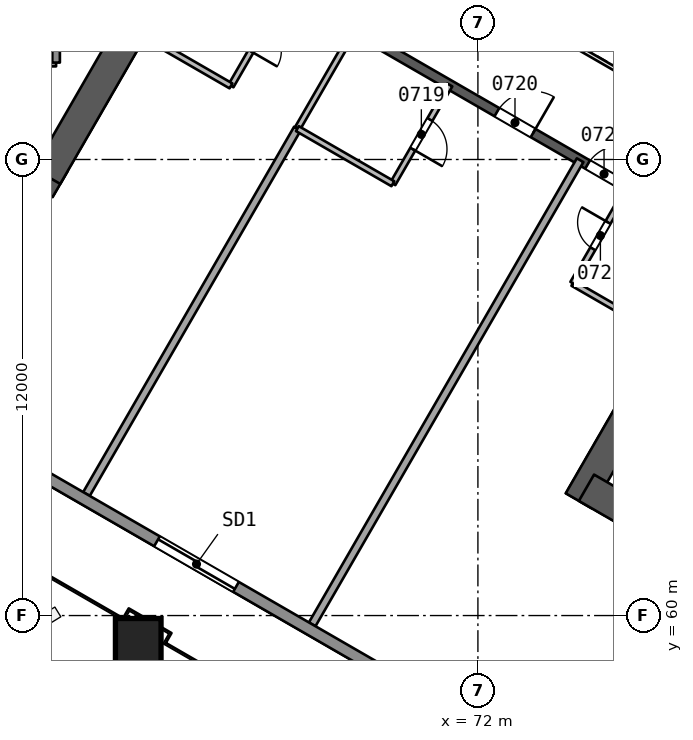
"""IFC4 building model, lengths in metres.
Left out: names, types, materials, properties, quantities, classifications, styles, units other than length and angle.
Written with IfcOpenShell. Run it as: python <this file> out.ifc"""

import sys

from ifc_helpers import new_model, si_unit, direction, frame, frame_2d, origin, origin_2d, place, context, subcontext, project, spatial, rectangle, extrude, element, fill, save


model = new_model("IFC4")
c1 = context("Model", 3, precision=1e-05, world=origin(), true_north=direction((0.0, 1.0)))
c2 = subcontext(c1, "Body", "Model", "MODEL_VIEW")
j1 = project(units=[si_unit("LENGTHUNIT", "METRE"), si_unit("PLANEANGLEUNIT", "RADIAN")], contexts=[c1])
p1 = place(None, origin())
s1 = spatial("IfcSite", under=j1, at=p1, CompositionType="ELEMENT")
p2 = place(p1, origin())
s2 = spatial("IfcBuilding", under=s1, at=p2, CompositionType="ELEMENT")
p3 = place(p2, frame((0.0, 0.0, 37.4)))
s3 = spatial("IfcBuildingStorey", under=s2, at=p3, CompositionType="ELEMENT", Elevation=37.4)
p4 = place(p3, frame((48.797, 78.408, 0.0), z_axis=(0.0, 0.0, 1.0), x_axis=(0.866032504327, -0.499987701298, 0.0)))
e1 = element("IfcWall", 1, at=p4, inside=s3, PredefinedType="SHEAR", context=c2, shape_type="SweptSolid", body=[
    extrude(rectangle(XDim=14.102, YDim=0.8, at=frame_2d((7.051, 0.0))), origin(), (0.0, 0.0, 1.0), 3.7),
])
p5 = place(p3, frame((60.664, 71.557, 0.0), z_axis=(0.0, 0.0, 1.0), x_axis=(0.50000409368, 0.866023040284, 0.0)))
e2 = element("IfcWall", 2, at=p5, inside=s3, PredefinedType="SHEAR", context=c2, shape_type="SweptSolid", body=[
    extrude(rectangle(XDim=9.98, YDim=0.8, at=frame_2d((4.99, 0.0))), origin(), (0.0, 0.0, 1.0), 3.7),
])
p6 = place(p5, frame((7.83, 0.0, 0.0)))
e3 = element("IfcOpeningElement", 3, at=p6, cuts=e2, PredefinedType="OPENING", context=c2, shape_type="SweptSolid", body=[
    extrude(rectangle(XDim=1.2, YDim=2.1, at=frame_2d((0.6, 1.05))), frame((0.0, 0.411, 0.0), z_axis=(0.0, -1.0, 0.0), x_axis=(1.0, 0.0, 0.0)), (0.0, 0.0, 1.0), 0.821),
])
p7 = place(p3, frame((79.731, 71.806, 0.0), z_axis=(0.0, 0.0, 1.0), x_axis=(-0.49999662545, -0.866027352073, 0.0)))
e4 = element("IfcWall", 4, at=p7, inside=s3, PredefinedType="SHEAR", context=c2, shape_type="SweptSolid", body=[
    extrude(rectangle(XDim=10.149, YDim=0.8, at=frame_2d((5.074, 0.0))), origin(), (0.0, 0.0, 1.0), 3.7),
])
p8 = place(p7, frame((0.719, 0.0, 0.0)))
e5 = element("IfcOpeningElement", 5, at=p8, cuts=e4, PredefinedType="OPENING", context=c2, shape_type="SweptSolid", body=[
    extrude(rectangle(XDim=1.2, YDim=2.1, at=frame_2d((0.6, 1.05))), frame((0.0, 0.411, 0.0), z_axis=(0.0, -1.0, 0.0), x_axis=(1.0, 0.0, 0.0)), (0.0, 0.0, 1.0), 0.821),
])
p9 = place(p3, frame((74.856, 63.363, 0.0), z_axis=(0.0, 0.0, 1.0), x_axis=(0.866029478545, -0.499992942241, 0.0)))
e6 = element("IfcWall", 6, at=p9, inside=s3, PredefinedType="SHEAR", context=c2, shape_type="SweptSolid", body=[
    extrude(rectangle(XDim=13.933, YDim=0.8, at=frame_2d((6.967, 0.0))), origin(), (0.0, 0.0, 1.0), 3.7),
])
p10 = place(p3, frame((64.7, 77.748, 0.0), z_axis=(0.0, 0.0, 1.0), x_axis=(0.866026492143, -0.499998114903, 0.0)))
e7 = element("IfcWall", 7, at=p10, inside=s3, PredefinedType="SHEAR", context=c2, shape_type="SweptSolid", body=[
    extrude(rectangle(XDim=15.588, YDim=0.25, at=frame_2d((7.794, 0.0))), origin(), (0.0, 0.0, 1.0), 3.2),
])
p11 = place(p10, frame((3.138, 0.0, 0.0)))
e8 = element("IfcOpeningElement", 8, at=p11, cuts=e7, PredefinedType="OPENING", context=c2, shape_type="SweptSolid", body=[
    extrude(rectangle(XDim=1.0, YDim=2.1, at=frame_2d((0.5, 1.05))), frame((0.0, 0.135, 0.0), z_axis=(0.0, -1.0, 0.0), x_axis=(1.0, 0.0, 0.0)), (0.0, 0.0, 1.0), 0.271),
])
p12 = place(p10, frame((9.006, 0.0, 0.0)))
e9 = element("IfcOpeningElement", 9, at=p12, cuts=e7, PredefinedType="OPENING", context=c2, shape_type="SweptSolid", body=[
    extrude(rectangle(XDim=1.1, YDim=2.1, at=frame_2d((0.55, 1.05))), frame((0.0, 0.135, 0.0), z_axis=(0.0, -1.0, 0.0), x_axis=(1.0, 0.0, 0.0)), (0.0, 0.0, 1.0), 0.271),
])
p13 = place(p10, frame((11.762, 0.0, 0.0)))
e10 = element("IfcOpeningElement", 10, at=p13, cuts=e7, PredefinedType="OPENING", context=c2, shape_type="SweptSolid", body=[
    extrude(rectangle(XDim=1.0, YDim=2.1, at=frame_2d((0.5, 1.05))), frame((0.0, 0.135, 0.0), z_axis=(0.0, -1.0, 0.0), x_axis=(1.0, 0.0, 0.0)), (0.0, 0.0, 1.0), 0.271),
])
p14 = place(p3, frame((63.05, 59.302, 0.0), z_axis=(0.010092954999, 0.017481261926, 0.999796248113), x_axis=(-0.866025993948, 0.499998977805, 1.48321e-07)))
e11 = element("IfcColumn", 11, at=p14, inside=s3, PredefinedType="COLUMN", context=c2, shape_type="SweptSolid", body=[
    extrude(rectangle(XDim=1.2, YDim=1.2, at=origin_2d()), origin(), (0.0, 0.0, 1.0), 3.701),
])
p15 = place(p3, frame((66.952, 76.448, 0.0), z_axis=(0.0, 0.0, 1.0), x_axis=(-0.499987231761, -0.866032775405, 0.0)))
e12 = element("IfcWall", 12, at=p15, inside=s3, PredefinedType="PARTITIONING", context=c2, shape_type="SweptSolid", body=[
    extrude(rectangle(XDim=2.9, YDim=0.15, at=frame_2d((1.45, 0.0))), origin(), (0.0, 0.0, 1.0), 3.2),
])
p16 = place(p15, frame((1.05, 0.0, 0.0)))
e13 = element("IfcOpeningElement", 13, at=p16, cuts=e12, PredefinedType="OPENING", context=c2, shape_type="SweptSolid", body=[
    extrude(rectangle(XDim=0.8, YDim=2.1, at=frame_2d((0.4, 1.05))), frame((0.0, 0.085, 0.0), z_axis=(0.0, -1.0, 0.0), x_axis=(1.0, 0.0, 0.0)), (0.0, 0.0, 1.0), 0.171),
])
p17 = place(p3, frame((65.502, 73.937, 0.0), z_axis=(0.0, 0.0, 1.0), x_axis=(-0.865994240961, 0.500053971709, 0.0)))
e14 = element("IfcWall", 14, at=p17, inside=s3, PredefinedType="PARTITIONING", context=c2, shape_type="SweptSolid", body=[
    extrude(rectangle(XDim=2.401, YDim=0.15, at=frame_2d((1.201, 0.0))), origin(), (0.0, 0.0, 1.0), 3.2),
])
p18 = place(p3, frame((61.699, 63.198, 0.0), z_axis=(0.0, 0.0, 1.0), x_axis=(0.499999115929, 0.866025914202, 0.0)))
e15 = element("IfcWall", 15, at=p18, inside=s3, PredefinedType="PARTITIONING", context=c2, shape_type="SweptSolid", body=[
    extrude(rectangle(XDim=11.102, YDim=0.2, at=frame_2d((5.551, 0.0))), origin(), (0.0, 0.0, 1.0), 3.2),
])
p19 = place(p3, frame((67.25, 72.812, 0.0), z_axis=(0.0, 0.0, 1.0), x_axis=(0.499990139034, 0.866031096941, 0.0)))
e16 = element("IfcWall", 16, at=p19, inside=s3, PredefinedType="PARTITIONING", context=c2, shape_type="SweptSolid", body=[
    extrude(rectangle(XDim=3.0, YDim=0.15, at=frame_2d((1.5, 0.0))), origin(), (0.0, 0.0, 1.0), 3.2),
])
p20 = place(p3, frame((71.261, 73.96, 0.0), z_axis=(0.0, 0.0, 1.0), x_axis=(-0.50002537861, -0.866010750942, 0.0)))
e17 = element("IfcWall", 17, at=p20, inside=s3, PredefinedType="PARTITIONING", context=c2, shape_type="SweptSolid", body=[
    extrude(rectangle(XDim=3.0, YDim=0.15, at=frame_2d((1.5, 0.0))), origin(), (0.0, 0.0, 1.0), 3.2),
])
p21 = place(p20, frame((1.05, 0.0, 0.0)))
e18 = element("IfcOpeningElement", 18, at=p21, cuts=e17, PredefinedType="OPENING", context=c2, shape_type="SweptSolid", body=[
    extrude(rectangle(XDim=0.9, YDim=2.1, at=frame_2d((0.45, 1.05))), frame((0.0, 0.085, 0.0), z_axis=(0.0, -1.0, 0.0), x_axis=(1.0, 0.0, 0.0)), (0.0, 0.0, 1.0), 0.171),
])
p22 = place(p3, frame((69.761, 71.362, 0.0), z_axis=(0.0, 0.0, 1.0), x_axis=(-0.866032775405, 0.499987231761, 0.0)))
e19 = element("IfcWall", 19, at=p22, inside=s3, PredefinedType="PARTITIONING", context=c2, shape_type="SweptSolid", body=[
    extrude(rectangle(XDim=2.9, YDim=0.15, at=frame_2d((1.45, 0.0))), origin(), (0.0, 0.0, 1.0), 3.2),
])
p23 = place(p3, frame((67.639, 59.768, 0.0), z_axis=(0.0, 0.0, 1.0), x_axis=(0.499997206141, 0.866027016814, 0.0)))
e20 = element("IfcWall", 20, at=p23, inside=s3, PredefinedType="PARTITIONING", context=c2, shape_type="SweptSolid", body=[
    extrude(rectangle(XDim=14.102, YDim=0.2, at=frame_2d((7.051, 0.0))), origin(), (0.0, 0.0, 1.0), 3.2),
])
p24 = place(p3, frame((76.578, 67.542, 0.0), z_axis=(0.0, 0.0, 1.0), x_axis=(-0.866038271014, 0.499977712642, 0.0)))
e21 = element("IfcWall", 21, at=p24, inside=s3, PredefinedType="PARTITIONING", context=c2, shape_type="SweptSolid", body=[
    extrude(rectangle(XDim=2.401, YDim=0.15, at=frame_2d((1.2, 0.0))), origin(), (0.0, 0.0, 1.0), 3.2),
])
p25 = place(p3, frame((74.498, 68.743, 0.0), z_axis=(0.0, 0.0, 1.0), x_axis=(0.499987231761, 0.866032775405, 0.0)))
e22 = element("IfcWall", 22, at=p25, inside=s3, PredefinedType="PARTITIONING", context=c2, shape_type="SweptSolid", body=[
    extrude(rectangle(XDim=2.9, YDim=0.15, at=frame_2d((1.45, 0.0))), origin(), (0.0, 0.0, 1.0), 3.2),
])
p26 = place(p25, frame((1.05, 0.0, 0.0)))
e23 = element("IfcOpeningElement", 23, at=p26, cuts=e22, PredefinedType="OPENING", context=c2, shape_type="SweptSolid", body=[
    extrude(rectangle(XDim=0.8, YDim=2.1, at=frame_2d((0.4, 1.05))), frame((0.0, 0.085, 0.0), z_axis=(0.0, -1.0, 0.0), x_axis=(1.0, 0.0, 0.0)), (0.0, 0.0, 1.0), 0.171),
])
p27 = place(p3, frame((90.91, 46.161, 0.0), z_axis=(0.0, 0.0, 1.0), x_axis=(-0.866026524777, 0.499998058379, 0.0)))
e24 = element("IfcWall", 24, at=p27, inside=s3, PredefinedType="SOLIDWALL", context=c2, shape_type="SweptSolid", body=[
    extrude(rectangle(XDim=61.395, YDim=0.3, at=frame_2d((30.698, 0.0))), origin(), (0.0, 0.0, 1.0), 3.2),
])
p28 = place(p27, frame((29.186, 0.0, 0.0)))
e25 = element("IfcOpeningElement", 25, at=p28, cuts=e24, PredefinedType="OPENING", context=c2, shape_type="SweptSolid", body=[
    extrude(rectangle(XDim=2.4, YDim=2.4, at=frame_2d((1.2, 1.2))), frame((0.0, 0.161, 0.0), z_axis=(0.0, -1.0, 0.0), x_axis=(1.0, 0.0, 0.0)), (0.0, 0.0, 1.0), 0.321),
])
p29 = place(p27, frame((46.448, 0.0, 0.0)))
e26 = element("IfcOpeningElement", 26, at=p29, cuts=e24, PredefinedType="OPENING", context=c2, shape_type="SweptSolid", body=[
    extrude(rectangle(XDim=2.4, YDim=2.4, at=frame_2d((1.2, 1.2))), frame((0.0, 0.161, 0.0), z_axis=(0.0, -1.0, 0.0), x_axis=(1.0, 0.0, 0.0)), (0.0, 0.0, 1.0), 0.321),
])
p30 = place(p27, frame((12.235, 0.0, 0.0)))
e27 = element("IfcOpeningElement", 27, at=p30, cuts=e24, PredefinedType="OPENING", context=c2, shape_type="SweptSolid", body=[
    extrude(rectangle(XDim=2.4, YDim=2.4, at=frame_2d((1.2, 1.2))), frame((0.0, 0.161, 0.0), z_axis=(0.0, -1.0, 0.0), x_axis=(1.0, 0.0, 0.0)), (0.0, 0.0, 1.0), 0.321),
])
p31 = place(p3, frame((60.9, 74.55, 0.0), z_axis=(0.0, 0.0, 1.0), x_axis=(-1.0, 0.0, 0.0)))
e28 = element("IfcWall", 28, at=p31, inside=s3, PredefinedType="SOLIDWALL", context=c2, shape_type="SweptSolid", body=[
    extrude(rectangle(XDim=3.05, YDim=0.2, at=frame_2d((1.525, 0.0))), origin(), (0.0, 0.0, 1.0), 3.2),
])
p32 = place(p3, frame((60.9, 85.45, 0.0), z_axis=(0.0, 0.0, 1.0), x_axis=(0.0, -1.0, 0.0)))
e29 = element("IfcWall", 29, at=p32, inside=s3, PredefinedType="SOLIDWALL", context=c2, shape_type="SweptSolid", body=[
    extrude(rectangle(XDim=10.9, YDim=0.2, at=frame_2d((5.45, 0.0))), origin(), (0.0, 0.0, 1.0), 3.2),
])
p33 = place(p32, frame((0.575, 0.0, 0.0)))
e30 = element("IfcOpeningElement", 30, at=p33, cuts=e29, PredefinedType="OPENING", context=c2, shape_type="SweptSolid", body=[
    extrude(rectangle(XDim=1.1, YDim=2.1, at=frame_2d((0.55, 1.05))), frame((0.0, 0.11, 0.0), z_axis=(0.0, -1.0, 0.0), x_axis=(1.0, 0.0, 0.0)), (0.0, 0.0, 1.0), 0.221),
])
p34 = place(p32, frame((2.825, 0.0, 0.0)))
e31 = element("IfcOpeningElement", 31, at=p34, cuts=e29, PredefinedType="OPENING", context=c2, shape_type="SweptSolid", body=[
    extrude(rectangle(XDim=1.1, YDim=2.1, at=frame_2d((0.55, 1.05))), frame((0.0, 0.11, 0.0), z_axis=(0.0, -1.0, 0.0), x_axis=(1.0, 0.0, 0.0)), (0.0, 0.0, 1.0), 0.221),
])
p35 = place(p32, frame((5.075, 0.0, 0.0)))
e32 = element("IfcOpeningElement", 32, at=p35, cuts=e29, PredefinedType="OPENING", context=c2, shape_type="SweptSolid", body=[
    extrude(rectangle(XDim=1.1, YDim=2.1, at=frame_2d((0.55, 1.05))), frame((0.0, 0.11, 0.0), z_axis=(0.0, -1.0, 0.0), x_axis=(1.0, 0.0, 0.0)), (0.0, 0.0, 1.0), 0.221),
])
p36 = place(p32, frame((7.325, 0.0, 0.0)))
e33 = element("IfcOpeningElement", 33, at=p36, cuts=e29, PredefinedType="OPENING", context=c2, shape_type="SweptSolid", body=[
    extrude(rectangle(XDim=1.1, YDim=2.1, at=frame_2d((0.55, 1.05))), frame((0.0, 0.11, 0.0), z_axis=(0.0, -1.0, 0.0), x_axis=(1.0, 0.0, 0.0)), (0.0, 0.0, 1.0), 0.221),
])
p37 = place(p3, frame((67.702, 78.948, 0.0), z_axis=(0.0, 0.0, 1.0), x_axis=(0.866026658274, -0.499997827154, 0.0)))
e34 = element("IfcWall", 34, at=p37, inside=s3, PredefinedType="PARTITIONING", context=c2, shape_type="SweptSolid", body=[
    extrude(rectangle(XDim=11.588, YDim=0.1, at=frame_2d((5.794, 0.0))), origin(), (0.0, 0.0, 1.0), 3.2),
])
p38 = place(p21, origin())
e35 = element("IfcDoor", 35, at=p38, inside=s3, OperationType="SINGLE_SWING_RIGHT", PredefinedType="NOTDEFINED", context=c2, shape_type="SweptSolid", body=[
    extrude(rectangle(XDim=0.9, YDim=2.1, at=frame_2d((0.45, 1.05))), frame((0.0, 0.025, 0.0), z_axis=(0.0, -1.0, 0.0), x_axis=(1.0, 0.0, 0.0)), (0.0, 0.0, 1.0), 0.05),
])
fill(e18, e35)
p39 = place(p12, origin())
e36 = element("IfcDoor", 36, at=p39, inside=s3, OperationType="SINGLE_SWING_RIGHT", PredefinedType="NOTDEFINED", context=c2, shape_type="SweptSolid", body=[
    extrude(rectangle(XDim=1.1, YDim=2.1, at=frame_2d((0.55, 1.05))), frame((0.0, 0.025, 0.0), z_axis=(0.0, -1.0, 0.0), x_axis=(1.0, 0.0, 0.0)), (0.0, 0.0, 1.0), 0.05),
])
fill(e9, e36)
p40 = place(p26, origin())
e37 = element("IfcDoor", 37, at=p40, inside=s3, OperationType="SINGLE_SWING_RIGHT", PredefinedType="NOTDEFINED", context=c2, shape_type="SweptSolid", body=[
    extrude(rectangle(XDim=0.8, YDim=2.1, at=frame_2d((0.4, 1.05))), frame((0.0, 0.025, 0.0), z_axis=(0.0, -1.0, 0.0), x_axis=(1.0, 0.0, 0.0)), (0.0, 0.0, 1.0), 0.05),
])
fill(e23, e37)
p41 = place(p13, origin())
e38 = element("IfcDoor", 38, at=p41, inside=s3, OperationType="SINGLE_SWING_RIGHT", PredefinedType="NOTDEFINED", context=c2, shape_type="SweptSolid", body=[
    extrude(rectangle(XDim=1.0, YDim=2.1, at=frame_2d((0.5, 1.05))), frame((0.0, 0.025, 0.0), z_axis=(0.0, -1.0, 0.0), x_axis=(1.0, 0.0, 0.0)), (0.0, 0.0, 1.0), 0.05),
])
fill(e10, e38)
p42 = place(p28, origin())
e39 = element("IfcDoor", 39, at=p42, inside=s3, OperationType="SLIDING_TO_LEFT", PredefinedType="NOTDEFINED", context=c2, shape_type="SweptSolid", body=[
    extrude(rectangle(XDim=2.4, YDim=2.4, at=frame_2d((1.2, 1.2))), frame((0.0, 0.025, 0.0), z_axis=(0.0, -1.0, 0.0), x_axis=(1.0, 0.0, 0.0)), (0.0, 0.0, 1.0), 0.05),
])
fill(e25, e39)
save(model, sys.argv[1])
